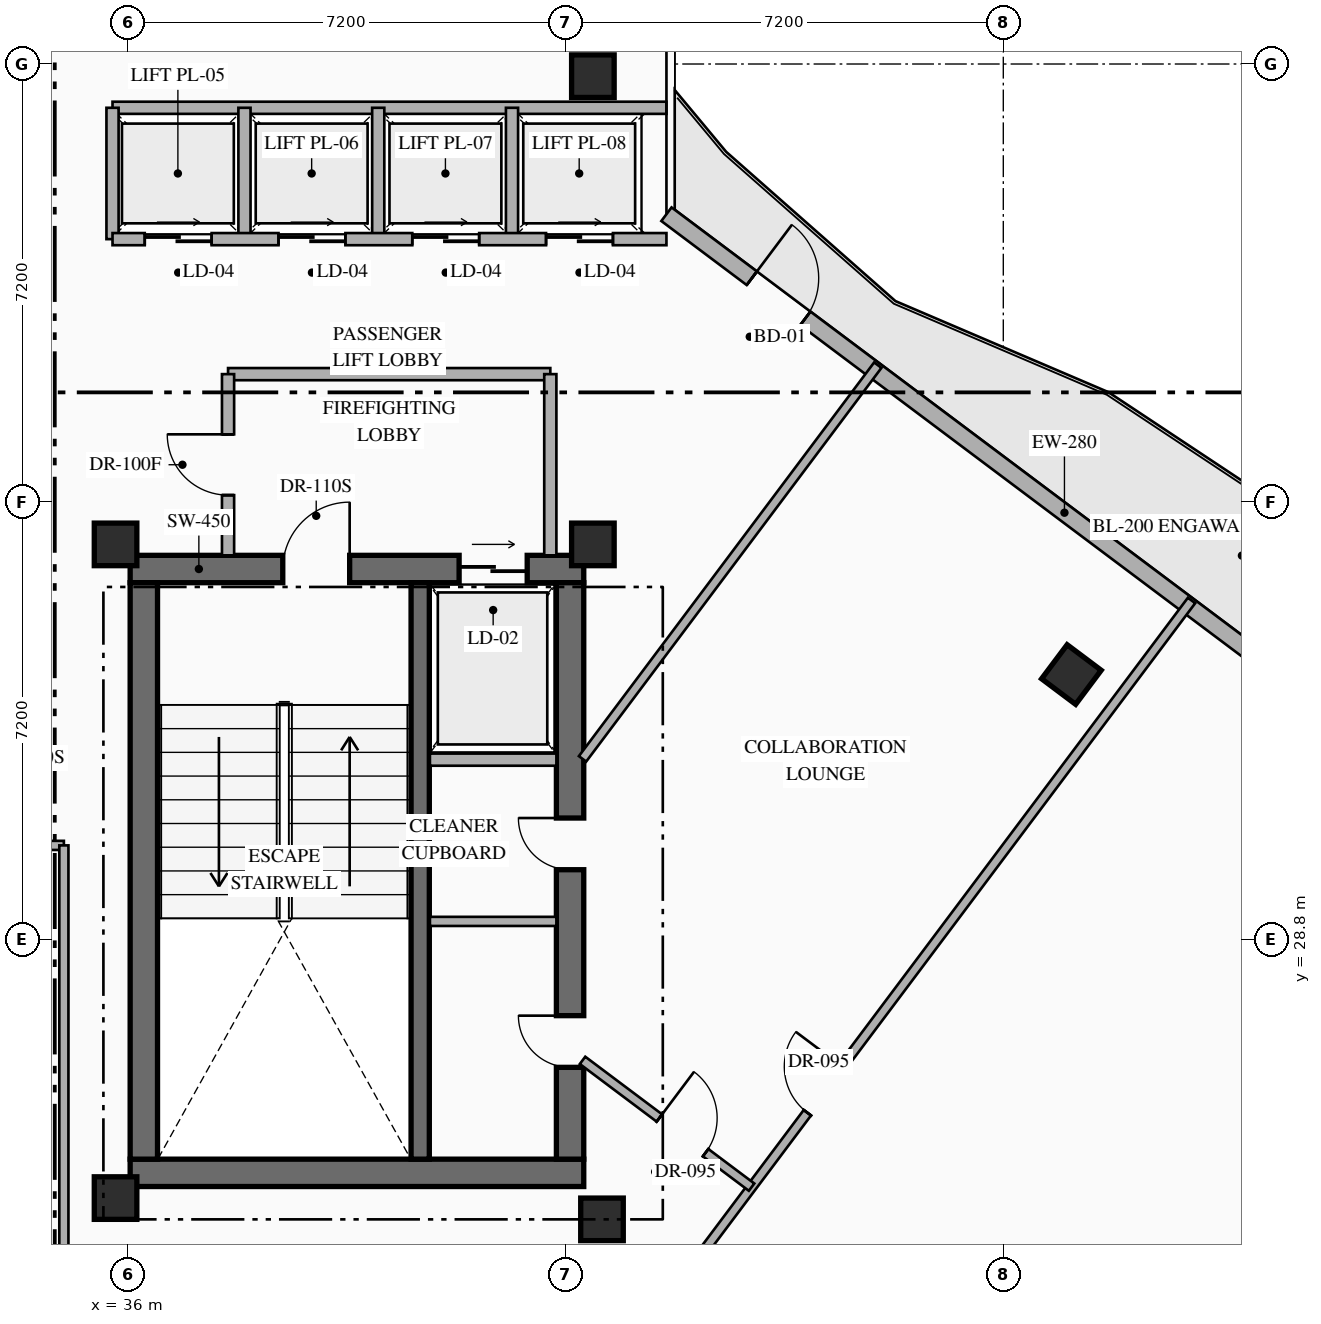
"""IFC4 building model, lengths in metres.
Left out: names, types, materials, properties, quantities, classifications, styles, units other than length and angle.
Written with IfcOpenShell. Run it as: python <this file> out.ifc"""

import sys

from ifc_helpers import new_model, si_unit, direction, frame, frame_2d, origin, origin_2d, place, context, subcontext, project, spatial, rectangle, hollow_rectangle, extrude, element, fill, save


model = new_model("IFC4")
c1 = context("Model", 3, precision=1e-05, world=origin(), true_north=direction((0.0, 1.0)))
c2 = subcontext(c1, "Body", "Model", "MODEL_VIEW")
j1 = project(units=[si_unit("LENGTHUNIT", "METRE"), si_unit("PLANEANGLEUNIT", "RADIAN")], contexts=[c1])
p1 = place(None, origin())
s1 = spatial("IfcSite", under=j1, at=p1, CompositionType="ELEMENT")
p2 = place(p1, origin())
s2 = spatial("IfcBuilding", under=s1, at=p2, CompositionType="ELEMENT")
p3 = place(p2, frame((0.0, 0.0, 220.35)))
s3 = spatial("IfcBuildingStorey", under=s2, at=p3, CompositionType="ELEMENT", Elevation=220.35)
p4 = place(p3, frame((36.04, 24.965, 0.0), z_axis=(0.0, 0.0, 1.0), x_axis=(1.0, 0.0, 0.0)))
e1 = element("IfcWall", 1, at=p4, inside=s3, PredefinedType="SHEAR", context=c2, shape_type="SweptSolid", body=[
    extrude(rectangle(XDim=7.46, YDim=0.45, at=frame_2d((3.73, 0.0))), origin(), (0.0, 0.0, 1.0), 3.6),
])
p5 = place(p3, frame((36.04, 34.895, 0.0), z_axis=(0.0, 0.0, 1.0), x_axis=(1.0, 0.0, 0.0)))
e2 = element("IfcWall", 2, at=p5, inside=s3, PredefinedType="SHEAR", context=c2, shape_type="SweptSolid", body=[
    extrude(rectangle(XDim=7.46, YDim=0.45, at=frame_2d((3.73, 0.0))), origin(), (0.0, 0.0, 1.0), 3.6),
])
p6 = place(p5, frame((2.51, 0.0, 0.0)))
e3 = element("IfcOpeningElement", 3, at=p6, cuts=e2, PredefinedType="OPENING", context=c2, shape_type="SweptSolid", body=[
    extrude(rectangle(XDim=1.1, YDim=2.2, at=frame_2d((0.55, 1.1))), frame((0.0, 0.235, 0.0), z_axis=(0.0, -1.0, 0.0), x_axis=(1.0, 0.0, 0.0)), (0.0, 0.0, 1.0), 0.47),
])
p7 = place(p5, frame((5.41, 0.0, 0.0)))
e4 = element("IfcOpeningElement", 4, at=p7, cuts=e2, PredefinedType="OPENING", context=c2, shape_type="SweptSolid", body=[
    extrude(rectangle(XDim=1.12, YDim=2.15, at=frame_2d((0.56, 1.075))), frame((0.0, 0.235, 0.0), z_axis=(0.0, -1.0, 0.0), x_axis=(1.0, 0.0, 0.0)), (0.0, 0.0, 1.0), 0.47),
])
p8 = place(p3, frame((36.265, 25.19, 0.0), z_axis=(0.0, 0.0, 1.0), x_axis=(0.0, 1.0, 0.0)))
e5 = element("IfcWall", 5, at=p8, inside=s3, PredefinedType="SHEAR", context=c2, shape_type="SweptSolid", body=[
    extrude(rectangle(XDim=9.48, YDim=0.45, at=frame_2d((4.74, 0.0))), origin(), (0.0, 0.0, 1.0), 3.6),
])
p9 = place(p3, frame((43.275, 25.19, 0.0), z_axis=(0.0, 0.0, 1.0), x_axis=(0.0, 1.0, 0.0)))
e6 = element("IfcWall", 6, at=p9, inside=s3, PredefinedType="SHEAR", context=c2, shape_type="SweptSolid", body=[
    extrude(rectangle(XDim=9.48, YDim=0.45, at=frame_2d((4.74, 0.0))), origin(), (0.0, 0.0, 1.0), 3.6),
])
p10 = place(p9, frame((1.51, 0.0, 0.0)))
e7 = element("IfcOpeningElement", 7, at=p10, cuts=e6, PredefinedType="OPENING", context=c2, shape_type="SweptSolid", body=[
    extrude(rectangle(XDim=0.85, YDim=2.08, at=frame_2d((0.425, 1.04))), frame((0.0, 0.235, 0.0), z_axis=(0.0, -1.0, 0.0), x_axis=(1.0, 0.0, 0.0)), (0.0, 0.0, 1.0), 0.47),
])
p11 = place(p9, frame((4.76, 0.0, 0.0)))
e8 = element("IfcOpeningElement", 8, at=p11, cuts=e6, PredefinedType="OPENING", context=c2, shape_type="SweptSolid", body=[
    extrude(rectangle(XDim=0.85, YDim=2.08, at=frame_2d((0.425, 1.04))), frame((0.0, 0.235, 0.0), z_axis=(0.0, -1.0, 0.0), x_axis=(1.0, 0.0, 0.0)), (0.0, 0.0, 1.0), 0.47),
])
p12 = place(p3, frame((40.81, 25.19, 0.0), z_axis=(0.0, 0.0, 1.0), x_axis=(0.0, 1.0, 0.0)))
e9 = element("IfcWall", 9, at=p12, inside=s3, PredefinedType="SHEAR", context=c2, shape_type="SweptSolid", body=[
    extrude(rectangle(XDim=9.48, YDim=0.3, at=frame_2d((4.74, 0.0))), origin(), (0.0, 0.0, 1.0), 3.6),
])
for number, where, z_axis, x_axis in (
    (10, (35.8, 24.55, 0.0), (0.0, 0.0, 1.0), (1.0, 0.0, 0.0)),
    (11, (43.8, 24.2, 0.0), (0.0, 0.0, 1.0), (1.0, 0.0, 0.0)),
    (12, (35.8, 35.3, 0.0), (0.0, 0.0, 1.0), (1.0, 0.0, 0.0)),
    (13, (43.65, 35.3, 0.0), (0.0, 0.0, 1.0), (1.0, 0.0, 0.0)),
    (14, (43.65, 43.0, 0.0), (0.0, 0.0, 1.0), (1.0, 0.0, 0.0)),
    (15, (51.52, 33.16, 0.0), (0.0, 0.0, 1.0), (0.8, -0.6, 0.0)),
):
    element("IfcColumn", number, at=place(p3, frame(where, z_axis=z_axis, x_axis=x_axis)), inside=s3, PredefinedType="COLUMN", context=c2, shape_type="SweptSolid", body=[
        extrude(hollow_rectangle(XDim=0.7, YDim=0.7, WallThickness=0.028, at=origin_2d()), origin(), (0.0, 0.0, 1.0), 3.6),
    ])
p13 = place(p3, frame((44.86, 40.73, 0.0), z_axis=(0.0, 0.0, 1.0), x_axis=(0.800007624502, -0.599989833863, 0.0)))
e16 = element("IfcWall", 16, at=p13, inside=s3, PredefinedType="STANDARD", context=c2, shape_type="SweptSolid", body=[
    extrude(rectangle(XDim=19.212, YDim=0.28, at=frame_2d((9.606, 0.0))), origin(), (0.0, 0.0, 1.0), 3.35),
])
p14 = place(p13, frame((1.755, 0.0, 0.0)))
e17 = element("IfcOpeningElement", 17, at=p14, cuts=e16, PredefinedType="OPENING", context=c2, shape_type="SweptSolid", body=[
    extrude(rectangle(XDim=1.1, YDim=2.2, at=frame_2d((0.55, 1.1))), frame((0.0, 0.15, 0.0), z_axis=(0.0, -1.0, 0.0), x_axis=(1.0, 0.0, 0.0)), (0.0, 0.0, 1.0), 0.3),
])
p15 = place(p13, frame((13.509, 0.0, 0.85)))
e18 = element("IfcOpeningElement", 18, at=p15, cuts=e16, PredefinedType="OPENING", context=c2, shape_type="SweptSolid", body=[
    extrude(rectangle(XDim=1.8, YDim=2.1, at=frame_2d((0.9, 1.05))), frame((0.0, 0.15, 0.0), z_axis=(0.0, -1.0, 0.0), x_axis=(1.0, 0.0, 0.0)), (0.0, 0.0, 1.0), 0.3),
])
p16 = place(p3, frame((40.97, 31.76, 0.0), z_axis=(0.0, 0.0, 1.0), x_axis=(1.0, 0.0, 0.0)))
e19 = element("IfcWall", 19, at=p16, inside=s3, PredefinedType="STANDARD", context=c2, shape_type="SweptSolid", body=[
    extrude(rectangle(XDim=2.08, YDim=0.2, at=frame_2d((1.04, 0.0))), origin(), (0.0, 0.0, 1.0), 3.35),
])
p17 = place(p3, frame((40.97, 29.1, 0.0), z_axis=(0.0, 0.0, 1.0), x_axis=(1.0, 0.0, 0.0)))
e20 = element("IfcWall", 20, at=p17, inside=s3, PredefinedType="PARTITIONING", context=c2, shape_type="SweptSolid", body=[
    extrude(rectangle(XDim=2.08, YDim=0.15, at=frame_2d((1.04, 0.0))), origin(), (0.0, 0.0, 1.0), 3.35),
])
p18 = place(p3, frame((37.65, 38.1, 0.0), z_axis=(0.0, 0.0, 1.0), x_axis=(1.0, 0.0, 0.0)))
e21 = element("IfcWall", 21, at=p18, inside=s3, PredefinedType="STANDARD", context=c2, shape_type="SweptSolid", body=[
    extrude(rectangle(XDim=5.3, YDim=0.2, at=frame_2d((2.65, 0.0))), origin(), (0.0, 0.0, 1.0), 3.35),
])
p19 = place(p3, frame((42.95, 35.12, 0.0), z_axis=(0.0, 0.0, 1.0), x_axis=(0.0, 1.0, 0.0)))
e22 = element("IfcWall", 22, at=p19, inside=s3, PredefinedType="STANDARD", context=c2, shape_type="SweptSolid", body=[
    extrude(rectangle(XDim=2.98, YDim=0.2, at=frame_2d((1.49, 0.0))), origin(), (0.0, 0.0, 1.0), 3.35),
])
p20 = place(p3, frame((37.65, 35.12, 0.0), z_axis=(0.0, 0.0, 1.0), x_axis=(0.0, 1.0, 0.0)))
e23 = element("IfcWall", 23, at=p20, inside=s3, PredefinedType="STANDARD", context=c2, shape_type="SweptSolid", body=[
    extrude(rectangle(XDim=2.98, YDim=0.2, at=frame_2d((1.49, 0.0))), origin(), (0.0, 0.0, 1.0), 3.35),
])
p21 = place(p20, frame((0.99, 0.0, 0.0)))
e24 = element("IfcOpeningElement", 24, at=p21, cuts=e23, PredefinedType="OPENING", context=c2, shape_type="SweptSolid", body=[
    extrude(rectangle(XDim=1.0, YDim=2.2, at=frame_2d((0.5, 1.1))), frame((0.0, 0.11, 0.0), z_axis=(0.0, -1.0, 0.0), x_axis=(1.0, 0.0, 0.0)), (0.0, 0.0, 1.0), 0.22),
])
p22 = place(p3, frame((35.75, 42.48, 0.0), z_axis=(0.0, 0.0, 1.0), x_axis=(1.0, 0.0, 0.0)))
e25 = element("IfcWall", 25, at=p22, inside=s3, PredefinedType="STANDARD", context=c2, shape_type="SweptSolid", body=[
    extrude(rectangle(XDim=9.11, YDim=0.2, at=frame_2d((4.555, 0.0))), origin(), (0.0, 0.0, 1.0), 3.35),
])
for number, where, z_axis, x_axis in (
    (26, (35.75, 40.32, 0.0), (0.0, 0.0, 1.0), (0.0, 1.0, 0.0)),
    (27, (37.92, 40.32, 0.0), (0.0, 0.0, 1.0), (0.0, 1.0, 0.0)),
    (28, (40.12, 40.32, 0.0), (0.0, 0.0, 1.0), (0.0, 1.0, 0.0)),
    (29, (42.32, 40.32, 0.0), (0.0, 0.0, 1.0), (0.0, 1.0, 0.0)),
):
    element("IfcWall", number, at=place(p3, frame(where, z_axis=z_axis, x_axis=x_axis)), inside=s3, PredefinedType="STANDARD", context=c2, shape_type="SweptSolid", body=[
        extrude(rectangle(XDim=2.16, YDim=0.2, at=frame_2d((1.08, 0.0))), origin(), (0.0, 0.0, 1.0), 3.35),
    ])
p23 = place(p3, frame((35.75, 40.32, 0.0), z_axis=(0.0, 0.0, 1.0), x_axis=(1.0, 0.0, 0.0)))
e30 = element("IfcWall", 30, at=p23, inside=s3, PredefinedType="STANDARD", context=c2, shape_type="SweptSolid", body=[
    extrude(rectangle(XDim=9.11, YDim=0.2, at=frame_2d((4.555, 0.0))), origin(), (0.0, 0.0, 1.0), 3.35),
])
p24 = place(p23, frame((0.53, 0.0, 0.0)))
e31 = element("IfcOpeningElement", 31, at=p24, cuts=e30, PredefinedType="OPENING", context=c2, shape_type="SweptSolid", body=[
    extrude(rectangle(XDim=1.1, YDim=2.18, at=frame_2d((0.55, 1.09))), frame((0.0, 0.11, 0.0), z_axis=(0.0, -1.0, 0.0), x_axis=(1.0, 0.0, 0.0)), (0.0, 0.0, 1.0), 0.22),
])
p25 = place(p23, frame((2.73, 0.0, 0.0)))
e32 = element("IfcOpeningElement", 32, at=p25, cuts=e30, PredefinedType="OPENING", context=c2, shape_type="SweptSolid", body=[
    extrude(rectangle(XDim=1.1, YDim=2.18, at=frame_2d((0.55, 1.09))), frame((0.0, 0.11, 0.0), z_axis=(0.0, -1.0, 0.0), x_axis=(1.0, 0.0, 0.0)), (0.0, 0.0, 1.0), 0.22),
])
p26 = place(p23, frame((4.93, 0.0, 0.0)))
e33 = element("IfcOpeningElement", 33, at=p26, cuts=e30, PredefinedType="OPENING", context=c2, shape_type="SweptSolid", body=[
    extrude(rectangle(XDim=1.1, YDim=2.18, at=frame_2d((0.55, 1.09))), frame((0.0, 0.11, 0.0), z_axis=(0.0, -1.0, 0.0), x_axis=(1.0, 0.0, 0.0)), (0.0, 0.0, 1.0), 0.22),
])
p27 = place(p23, frame((7.13, 0.0, 0.0)))
e34 = element("IfcOpeningElement", 34, at=p27, cuts=e30, PredefinedType="OPENING", context=c2, shape_type="SweptSolid", body=[
    extrude(rectangle(XDim=1.1, YDim=2.18, at=frame_2d((0.55, 1.09))), frame((0.0, 0.11, 0.0), z_axis=(0.0, -1.0, 0.0), x_axis=(1.0, 0.0, 0.0)), (0.0, 0.0, 1.0), 0.22),
])
p28 = place(p3, frame((25.55, 30.35, 0.0), z_axis=(0.0, 0.0, 1.0), x_axis=(1.0, 0.0, 0.0)))
e35 = element("IfcWall", 35, at=p28, inside=s3, PredefinedType="PARTITIONING", context=c2, shape_type="SweptSolid", body=[
    extrude(rectangle(XDim=9.4, YDim=0.15, at=frame_2d((4.7, 0.0))), origin(), (0.0, 0.0, 1.0), 3.35),
])
p29 = place(p28, frame((7.638, 0.0, 0.0)))
e36 = element("IfcOpeningElement", 36, at=p29, cuts=e35, PredefinedType="OPENING", context=c2, shape_type="SweptSolid", body=[
    extrude(rectangle(XDim=1.0, YDim=2.15, at=frame_2d((0.5, 1.075))), frame((0.0, 0.085, 0.0), z_axis=(0.0, -1.0, 0.0), x_axis=(1.0, 0.0, 0.0)), (0.0, 0.0, 1.0), 0.17),
])
p30 = place(p3, frame((34.95, 23.2, 0.0), z_axis=(0.0, 0.0, 1.0), x_axis=(0.0, 1.0, 0.0)))
e37 = element("IfcWall", 37, at=p30, inside=s3, PredefinedType="PARTITIONING", context=c2, shape_type="SweptSolid", body=[
    extrude(rectangle(XDim=7.15, YDim=0.15, at=frame_2d((3.575, 0.0))), origin(), (0.0, 0.0, 1.0), 3.35),
])
p31 = place(p3, frame((41.43, 18.29, 0.0), z_axis=(0.0, 0.0, 1.0), x_axis=(0.600007769734, 0.79999417264, 0.0)))
e38 = element("IfcWall", 38, at=p31, inside=s3, PredefinedType="PARTITIONING", context=c2, shape_type="SweptSolid", body=[
    extrude(rectangle(XDim=20.11, YDim=0.15, at=frame_2d((10.055, 0.0))), origin(), (0.0, 0.0, 1.0), 3.35),
])
p32 = place(p31, frame((9.58, 0.0, 0.0)))
e39 = element("IfcOpeningElement", 39, at=p32, cuts=e38, PredefinedType="OPENING", context=c2, shape_type="SweptSolid", body=[
    extrude(rectangle(XDim=0.95, YDim=2.15, at=frame_2d((0.475, 1.075))), frame((0.0, 0.085, 0.0), z_axis=(0.0, -1.0, 0.0), x_axis=(1.0, 0.0, 0.0)), (0.0, 0.0, 1.0), 0.17),
])
p33 = place(p3, frame((43.48, 26.815, 0.0), z_axis=(0.0, 0.0, 1.0), x_axis=(0.800008430676, -0.599988758934, 0.0)))
e40 = element("IfcWall", 40, at=p33, inside=s3, PredefinedType="PARTITIONING", context=c2, shape_type="SweptSolid", body=[
    extrude(rectangle(XDim=3.475, YDim=0.15, at=frame_2d((1.738, 0.0))), origin(), (0.0, 0.0, 1.0), 3.35),
])
p34 = place(p33, frame((1.58, 0.0, 0.0)))
e41 = element("IfcOpeningElement", 41, at=p34, cuts=e40, PredefinedType="OPENING", context=c2, shape_type="SweptSolid", body=[
    extrude(rectangle(XDim=0.95, YDim=2.15, at=frame_2d((0.475, 1.075))), frame((0.0, 0.085, 0.0), z_axis=(0.0, -1.0, 0.0), x_axis=(1.0, 0.0, 0.0)), (0.0, 0.0, 1.0), 0.17),
])
p35 = place(p3, frame((43.48, 31.773, 0.0), z_axis=(0.0, 0.0, 1.0), x_axis=(0.599971041729, 0.800021717885, 0.0)))
e42 = element("IfcWall", 42, at=p35, inside=s3, PredefinedType="PARTITIONING", context=c2, shape_type="SweptSolid", body=[
    extrude(rectangle(XDim=8.094, YDim=0.15, at=frame_2d((4.047, 0.0))), origin(), (0.0, 0.0, 1.0), 3.35),
])
p36 = place(p3, frame((27.91, 26.68, 0.0), z_axis=(0.0, 0.0, 1.0), x_axis=(0.800005938517, -0.599992081896, 0.0)))
e43 = element("IfcWall", 43, at=p36, inside=s3, PredefinedType="PARTITIONING", context=c2, shape_type="SweptSolid", body=[
    extrude(rectangle(XDim=14.8, YDim=0.15, at=frame_2d((7.4, 0.0))), origin(), (0.0, 0.0, 1.0), 3.35),
])
p37 = place(p36, frame((9.281, 0.0, 0.0)))
e44 = element("IfcOpeningElement", 44, at=p37, cuts=e43, PredefinedType="OPENING", context=c2, shape_type="SweptSolid", body=[
    extrude(rectangle(XDim=0.95, YDim=2.15, at=frame_2d((0.475, 1.075))), frame((0.0, 0.085, 0.0), z_axis=(0.0, -1.0, 0.0), x_axis=(1.0, 0.0, 0.0)), (0.0, 0.0, 1.0), 0.17),
])
p38 = place(p14, origin())
e45 = element("IfcDoor", 45, at=p38, inside=s3, OperationType="SINGLE_SWING_LEFT", PredefinedType="DOOR", context=c2, shape_type="SweptSolid", body=[
    extrude(rectangle(XDim=1.1, YDim=2.2, at=frame_2d((0.55, 1.1))), frame((0.0, 0.025, 0.0), z_axis=(0.0, -1.0, 0.0), x_axis=(1.0, 0.0, 0.0)), (0.0, 0.0, 1.0), 0.05),
])
fill(e17, e45)
p39 = place(p6, origin())
e46 = element("IfcDoor", 46, at=p39, inside=s3, OperationType="SINGLE_SWING_RIGHT", PredefinedType="DOOR", context=c2, shape_type="SweptSolid", body=[
    extrude(rectangle(XDim=1.1, YDim=2.2, at=frame_2d((0.55, 1.1))), frame((0.0, 0.025, 0.0), z_axis=(0.0, -1.0, 0.0), x_axis=(1.0, 0.0, 0.0)), (0.0, 0.0, 1.0), 0.05),
])
fill(e3, e46)
p40 = place(p7, origin())
e47 = element("IfcDoor", 47, at=p40, inside=s3, OperationType="SLIDING_TO_RIGHT", PredefinedType="USERDEFINED", context=c2, shape_type="SweptSolid", body=[
    extrude(rectangle(XDim=1.12, YDim=2.15, at=frame_2d((0.56, 1.075))), frame((0.0, 0.025, 0.0), z_axis=(0.0, -1.0, 0.0), x_axis=(1.0, 0.0, 0.0)), (0.0, 0.0, 1.0), 0.05),
])
fill(e4, e47)
p41 = place(p10, origin())
e48 = element("IfcDoor", 48, at=p41, inside=s3, OperationType="SINGLE_SWING_RIGHT", PredefinedType="DOOR", context=c2, shape_type="SweptSolid", body=[
    extrude(rectangle(XDim=0.85, YDim=2.08, at=frame_2d((0.425, 1.04))), frame((0.0, 0.025, 0.0), z_axis=(0.0, -1.0, 0.0), x_axis=(1.0, 0.0, 0.0)), (0.0, 0.0, 1.0), 0.05),
])
fill(e7, e48)
p42 = place(p11, origin())
e49 = element("IfcDoor", 49, at=p42, inside=s3, OperationType="SINGLE_SWING_RIGHT", PredefinedType="DOOR", context=c2, shape_type="SweptSolid", body=[
    extrude(rectangle(XDim=0.85, YDim=2.08, at=frame_2d((0.425, 1.04))), frame((0.0, 0.025, 0.0), z_axis=(0.0, -1.0, 0.0), x_axis=(1.0, 0.0, 0.0)), (0.0, 0.0, 1.0), 0.05),
])
fill(e8, e49)
p43 = place(p21, origin())
e50 = element("IfcDoor", 50, at=p43, inside=s3, OperationType="SINGLE_SWING_RIGHT", PredefinedType="DOOR", context=c2, shape_type="SweptSolid", body=[
    extrude(rectangle(XDim=1.0, YDim=2.2, at=frame_2d((0.5, 1.1))), frame((0.0, 0.025, 0.0), z_axis=(0.0, -1.0, 0.0), x_axis=(1.0, 0.0, 0.0)), (0.0, 0.0, 1.0), 0.05),
])
fill(e24, e50)
p44 = place(p24, origin())
e51 = element("IfcDoor", 51, at=p44, inside=s3, OperationType="SLIDING_TO_RIGHT", PredefinedType="USERDEFINED", context=c2, shape_type="SweptSolid", body=[
    extrude(rectangle(XDim=1.1, YDim=2.18, at=frame_2d((0.55, 1.09))), frame((0.0, 0.025, 0.0), z_axis=(0.0, -1.0, 0.0), x_axis=(1.0, 0.0, 0.0)), (0.0, 0.0, 1.0), 0.05),
])
fill(e31, e51)
p45 = place(p25, origin())
e52 = element("IfcDoor", 52, at=p45, inside=s3, OperationType="SLIDING_TO_RIGHT", PredefinedType="USERDEFINED", context=c2, shape_type="SweptSolid", body=[
    extrude(rectangle(XDim=1.1, YDim=2.18, at=frame_2d((0.55, 1.09))), frame((0.0, 0.025, 0.0), z_axis=(0.0, -1.0, 0.0), x_axis=(1.0, 0.0, 0.0)), (0.0, 0.0, 1.0), 0.05),
])
fill(e32, e52)
p46 = place(p26, origin())
e53 = element("IfcDoor", 53, at=p46, inside=s3, OperationType="SLIDING_TO_RIGHT", PredefinedType="USERDEFINED", context=c2, shape_type="SweptSolid", body=[
    extrude(rectangle(XDim=1.1, YDim=2.18, at=frame_2d((0.55, 1.09))), frame((0.0, 0.025, 0.0), z_axis=(0.0, -1.0, 0.0), x_axis=(1.0, 0.0, 0.0)), (0.0, 0.0, 1.0), 0.05),
])
fill(e33, e53)
p47 = place(p27, origin())
e54 = element("IfcDoor", 54, at=p47, inside=s3, OperationType="SLIDING_TO_RIGHT", PredefinedType="USERDEFINED", context=c2, shape_type="SweptSolid", body=[
    extrude(rectangle(XDim=1.1, YDim=2.18, at=frame_2d((0.55, 1.09))), frame((0.0, 0.025, 0.0), z_axis=(0.0, -1.0, 0.0), x_axis=(1.0, 0.0, 0.0)), (0.0, 0.0, 1.0), 0.05),
])
fill(e34, e54)
p48 = place(p32, origin())
e55 = element("IfcDoor", 55, at=p48, inside=s3, OperationType="SINGLE_SWING_RIGHT", PredefinedType="DOOR", context=c2, shape_type="SweptSolid", body=[
    extrude(rectangle(XDim=0.95, YDim=2.15, at=frame_2d((0.475, 1.075))), frame((0.0, 0.025, 0.0), z_axis=(0.0, -1.0, 0.0), x_axis=(1.0, 0.0, 0.0)), (0.0, 0.0, 1.0), 0.05),
])
fill(e39, e55)
p49 = place(p34, origin())
e56 = element("IfcDoor", 56, at=p49, inside=s3, OperationType="SINGLE_SWING_LEFT", PredefinedType="DOOR", context=c2, shape_type="SweptSolid", body=[
    extrude(rectangle(XDim=0.95, YDim=2.15, at=frame_2d((0.475, 1.075))), frame((0.0, 0.025, 0.0), z_axis=(0.0, -1.0, 0.0), x_axis=(1.0, 0.0, 0.0)), (0.0, 0.0, 1.0), 0.05),
])
fill(e41, e56)
save(model, sys.argv[1])
